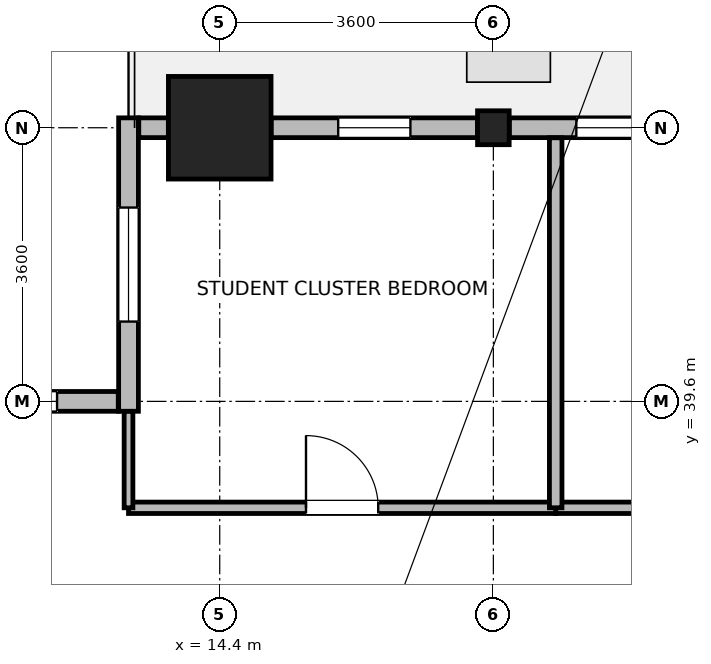
"""IFC4 building model, lengths in metres.
Left out: names, types, materials, properties, quantities, classifications, styles, units other than length and angle.
Written with IfcOpenShell. Run it as: python <this file> out.ifc"""

import sys

from ifc_helpers import new_model, si_unit, direction, frame, frame_2d, origin, origin_2d, place, context, subcontext, project, spatial, rectangle, i_section, extrude, source, transform, mapped, element, fill, save


model = new_model("IFC4")
c1 = context("Model", 3, precision=1e-05, world=origin(), true_north=direction((0.0, 1.0)))
c2 = subcontext(c1, "Body", "Model", "MODEL_VIEW")
j1 = project(units=[si_unit("LENGTHUNIT", "METRE"), si_unit("PLANEANGLEUNIT", "RADIAN")], contexts=[c1])
p1 = place(None, origin())
s1 = spatial("IfcSite", under=j1, at=p1, CompositionType="ELEMENT")
p2 = place(p1, origin())
s2 = spatial("IfcBuilding", under=s1, at=p2, CompositionType="ELEMENT")
p3 = place(p2, frame((0.0, 0.0, 58.6)))
s3 = spatial("IfcBuildingStorey", under=s2, at=p3, CompositionType="ELEMENT", Elevation=58.6)
m1 = source(origin(), c2, "Body", "SweptSolid", [
    extrude(rectangle(XDim=1.35, YDim=1.35, at=origin_2d()), origin(), (0.0, 0.0, 1.0), 3.7),
])
p4 = place(p3, frame((14.4, 43.2, 0.0), z_axis=(0.0, 0.0, 1.0), x_axis=(1.0, 0.0, 0.0)))
e1 = element("IfcColumn", 1, at=p4, inside=s3, PredefinedType="COLUMN", context=c2, shape_type="MappedRepresentation", body=[
    mapped(m1, transform((0.0, 0.0, 0.0), x_axis=(1.0, 0.0, 0.0), y_axis=(0.0, 1.0, 0.0), z_axis=(0.0, 0.0, 1.0), scale=1.0)),
])
m2 = source(origin(), c2, "Body", "SweptSolid", [
    extrude(i_section(OverallWidth=0.416, OverallDepth=0.446, WebThickness=0.029, FlangeThickness=0.04, FilletRadius=0.015, at=origin_2d()), origin(), (0.0, 0.0, 1.0), 3.7),
])
p5 = place(p3, frame((18.0, 43.2, 0.0), z_axis=(0.0, 0.0, 1.0), x_axis=(1.0, 0.0, 0.0)))
e2 = element("IfcColumn", 2, at=p5, inside=s3, PredefinedType="COLUMN", context=c2, shape_type="MappedRepresentation", body=[
    mapped(m2, transform((0.0, 0.0, 0.0), x_axis=(1.0, 0.0, 0.0), y_axis=(0.0, 1.0, 0.0), z_axis=(0.0, 0.0, 1.0), scale=1.0)),
])
p6 = place(p3, frame((18.209, 43.2, 0.0), z_axis=(0.0, 0.0, 1.0), x_axis=(1.0, 0.0, 0.0)))
e3 = element("IfcWall", 3, at=p6, inside=s3, PredefinedType="STANDARD", context=c2, shape_type="SweptSolid", body=[
    extrude(rectangle(XDim=2.715, YDim=0.26, at=frame_2d((1.357, 0.0))), origin(), (0.0, 0.0, 1.0), 2.93),
])
p7 = place(p6, frame((0.883, 0.0, 0.85)))
e4 = element("IfcOpeningElement", 4, at=p7, cuts=e3, PredefinedType="OPENING", context=c2, shape_type="SweptSolid", body=[
    extrude(rectangle(XDim=0.95, YDim=1.75, at=frame_2d((0.475, 0.875))), frame((0.0, 0.14, 0.0), z_axis=(0.0, -1.0, 0.0), x_axis=(1.0, 0.0, 0.0)), (0.0, 0.0, 1.0), 0.28),
])
p8 = place(p3, frame((15.076, 43.2, 0.0), z_axis=(0.0, 0.0, 1.0), x_axis=(1.0, 0.0, 0.0)))
e5 = element("IfcWall", 5, at=p8, inside=s3, PredefinedType="STANDARD", context=c2, shape_type="SweptSolid", body=[
    extrude(rectangle(XDim=2.715, YDim=0.26, at=frame_2d((1.357, 0.0))), origin(), (0.0, 0.0, 1.0), 2.93),
])
p9 = place(p8, frame((0.883, 0.0, 0.85)))
e6 = element("IfcOpeningElement", 6, at=p9, cuts=e5, PredefinedType="OPENING", context=c2, shape_type="SweptSolid", body=[
    extrude(rectangle(XDim=0.95, YDim=1.75, at=frame_2d((0.475, 0.875))), frame((0.0, 0.14, 0.0), z_axis=(0.0, -1.0, 0.0), x_axis=(1.0, 0.0, 0.0)), (0.0, 0.0, 1.0), 0.28),
])
p10 = place(p3, frame((13.335, 43.2, 0.0), z_axis=(0.0, 0.0, 1.0), x_axis=(1.0, 0.0, 0.0)))
e7 = element("IfcWall", 7, at=p10, inside=s3, PredefinedType="STANDARD", context=c2, shape_type="SweptSolid", body=[
    extrude(rectangle(XDim=0.389, YDim=0.26, at=frame_2d((0.195, 0.0))), origin(), (0.0, 0.0, 1.0), 3.43),
])
p11 = place(p3, frame((13.2, 39.47, 0.0), z_axis=(0.0, 0.0, 1.0), x_axis=(0.0, 1.0, 0.0)))
e8 = element("IfcWall", 8, at=p11, inside=s3, PredefinedType="STANDARD", context=c2, shape_type="SweptSolid", body=[
    extrude(rectangle(XDim=3.86, YDim=0.26, at=frame_2d((1.93, 0.0))), origin(), (0.0, 0.0, 1.0), 3.43),
])
p12 = place(p11, frame((1.18, 0.0, 0.85)))
e9 = element("IfcOpeningElement", 9, at=p12, cuts=e8, PredefinedType="OPENING", context=c2, shape_type="SweptSolid", body=[
    extrude(rectangle(XDim=1.5, YDim=1.85, at=frame_2d((0.75, 0.925))), frame((0.0, 0.14, 0.0), z_axis=(0.0, -1.0, 0.0), x_axis=(1.0, 0.0, 0.0)), (0.0, 0.0, 1.0), 0.28),
])
p13 = place(p3, frame((3.735, 39.6, 0.0), z_axis=(0.0, 0.0, 1.0), x_axis=(1.0, 0.0, 0.0)))
e10 = element("IfcWall", 10, at=p13, inside=s3, PredefinedType="STANDARD", context=c2, shape_type="SweptSolid", body=[
    extrude(rectangle(XDim=9.33, YDim=0.26, at=frame_2d((4.665, 0.0))), origin(), (0.0, 0.0, 1.0), 3.43),
])
p14 = place(p13, frame((0.805, 0.0, 0.85)))
e11 = element("IfcOpeningElement", 11, at=p14, cuts=e10, PredefinedType="OPENING", context=c2, shape_type="SweptSolid", body=[
    extrude(rectangle(XDim=1.5, YDim=1.85, at=frame_2d((0.75, 0.925))), frame((0.0, 0.14, 0.0), z_axis=(0.0, -1.0, 0.0), x_axis=(1.0, 0.0, 0.0)), (0.0, 0.0, 1.0), 0.28),
])
p15 = place(p13, frame((3.915, 0.0, 0.85)))
e12 = element("IfcOpeningElement", 12, at=p15, cuts=e10, PredefinedType="OPENING", context=c2, shape_type="SweptSolid", body=[
    extrude(rectangle(XDim=1.5, YDim=1.85, at=frame_2d((0.75, 0.925))), frame((0.0, 0.14, 0.0), z_axis=(0.0, -1.0, 0.0), x_axis=(1.0, 0.0, 0.0)), (0.0, 0.0, 1.0), 0.28),
])
p16 = place(p13, frame((7.025, 0.0, 0.85)))
e13 = element("IfcOpeningElement", 13, at=p16, cuts=e10, PredefinedType="OPENING", context=c2, shape_type="SweptSolid", body=[
    extrude(rectangle(XDim=1.5, YDim=1.85, at=frame_2d((0.75, 0.925))), frame((0.0, 0.14, 0.0), z_axis=(0.0, -1.0, 0.0), x_axis=(1.0, 0.0, 0.0)), (0.0, 0.0, 1.0), 0.28),
])
p17 = place(p3, frame((18.82, 38.2, 0.0), z_axis=(0.0, 0.0, 1.0), x_axis=(1.0, 0.0, 0.0)))
e14 = element("IfcWall", 14, at=p17, inside=s3, PredefinedType="PARTITIONING", context=c2, shape_type="SweptSolid", body=[
    extrude(rectangle(XDim=5.94, YDim=0.15, at=frame_2d((2.97, 0.0))), origin(), (0.0, 0.0, 1.0), 3.43),
])
p18 = place(p17, frame((2.495, 0.0, 0.0)))
e15 = element("IfcOpeningElement", 15, at=p18, cuts=e14, PredefinedType="OPENING", context=c2, shape_type="SweptSolid", body=[
    extrude(rectangle(XDim=0.95, YDim=2.1, at=frame_2d((0.475, 1.05))), frame((0.0, 0.085, 0.0), z_axis=(0.0, -1.0, 0.0), x_axis=(1.0, 0.0, 0.0)), (0.0, 0.0, 1.0), 0.17),
])
p19 = place(p3, frame((13.2, 38.2, 0.0), z_axis=(0.0, 0.0, 1.0), x_axis=(1.0, 0.0, 0.0)))
e16 = element("IfcWall", 16, at=p19, inside=s3, PredefinedType="PARTITIONING", context=c2, shape_type="SweptSolid", body=[
    extrude(rectangle(XDim=5.62, YDim=0.15, at=frame_2d((2.81, 0.0))), origin(), (0.0, 0.0, 1.0), 3.43),
])
p20 = place(p19, frame((2.335, 0.0, 0.0)))
e17 = element("IfcOpeningElement", 17, at=p20, cuts=e16, PredefinedType="OPENING", context=c2, shape_type="SweptSolid", body=[
    extrude(rectangle(XDim=0.95, YDim=2.1, at=frame_2d((0.475, 1.05))), frame((0.0, 0.085, 0.0), z_axis=(0.0, -1.0, 0.0), x_axis=(1.0, 0.0, 0.0)), (0.0, 0.0, 1.0), 0.17),
])
p21 = place(p3, frame((13.2, 38.2, 0.0), z_axis=(0.0, 0.0, 1.0), x_axis=(0.0, 1.0, 0.0)))
e18 = element("IfcWall", 18, at=p21, inside=s3, PredefinedType="PARTITIONING", context=c2, shape_type="SweptSolid", body=[
    extrude(rectangle(XDim=1.268, YDim=0.115, at=frame_2d((0.634, 0.0))), origin(), (0.0, 0.0, 1.0), 3.43),
])
p22 = place(p3, frame((18.82, 38.2, 0.0), z_axis=(0.0, 0.0, 1.0), x_axis=(0.0, 1.0, 0.0)))
e19 = element("IfcWall", 19, at=p22, inside=s3, PredefinedType="PARTITIONING", context=c2, shape_type="SweptSolid", body=[
    extrude(rectangle(XDim=4.868, YDim=0.165, at=frame_2d((2.434, 0.0))), origin(), (0.0, 0.0, 1.0), 3.43),
])
p23 = place(p7, origin())
e20 = element("IfcWindow", 20, at=p23, inside=s3, PartitioningType="SINGLE_PANEL", PredefinedType="WINDOW", context=c2, shape_type="SweptSolid", body=[
    extrude(rectangle(XDim=0.95, YDim=1.75, at=frame_2d((0.475, 0.875))), frame((0.0, 0.03, 0.0), z_axis=(0.0, -1.0, 0.0), x_axis=(1.0, 0.0, 0.0)), (0.0, 0.0, 1.0), 0.06),
])
fill(e4, e20)
p24 = place(p9, origin())
e21 = element("IfcWindow", 21, at=p24, inside=s3, PartitioningType="SINGLE_PANEL", PredefinedType="WINDOW", context=c2, shape_type="SweptSolid", body=[
    extrude(rectangle(XDim=0.95, YDim=1.75, at=frame_2d((0.475, 0.875))), frame((0.0, 0.03, 0.0), z_axis=(0.0, -1.0, 0.0), x_axis=(1.0, 0.0, 0.0)), (0.0, 0.0, 1.0), 0.06),
])
fill(e6, e21)
p25 = place(p12, origin())
e22 = element("IfcWindow", 22, at=p25, inside=s3, PartitioningType="SINGLE_PANEL", PredefinedType="WINDOW", context=c2, shape_type="SweptSolid", body=[
    extrude(rectangle(XDim=1.5, YDim=1.85, at=frame_2d((0.75, 0.925))), frame((0.0, 0.03, 0.0), z_axis=(0.0, -1.0, 0.0), x_axis=(1.0, 0.0, 0.0)), (0.0, 0.0, 1.0), 0.06),
])
fill(e9, e22)
p26 = place(p16, origin())
e23 = element("IfcWindow", 23, at=p26, inside=s3, PartitioningType="SINGLE_PANEL", PredefinedType="WINDOW", context=c2, shape_type="SweptSolid", body=[
    extrude(rectangle(XDim=1.5, YDim=1.85, at=frame_2d((0.75, 0.925))), frame((0.0, 0.03, 0.0), z_axis=(0.0, -1.0, 0.0), x_axis=(1.0, 0.0, 0.0)), (0.0, 0.0, 1.0), 0.06),
])
fill(e13, e23)
p27 = place(p20, origin())
e24 = element("IfcDoor", 24, at=p27, inside=s3, OperationType="SINGLE_SWING_LEFT", PredefinedType="DOOR", context=c2, shape_type="SweptSolid", body=[
    extrude(rectangle(XDim=0.95, YDim=2.1, at=frame_2d((0.475, 1.05))), frame((0.0, 0.025, 0.0), z_axis=(0.0, -1.0, 0.0), x_axis=(1.0, 0.0, 0.0)), (0.0, 0.0, 1.0), 0.05),
])
fill(e17, e24)
save(model, sys.argv[1])
